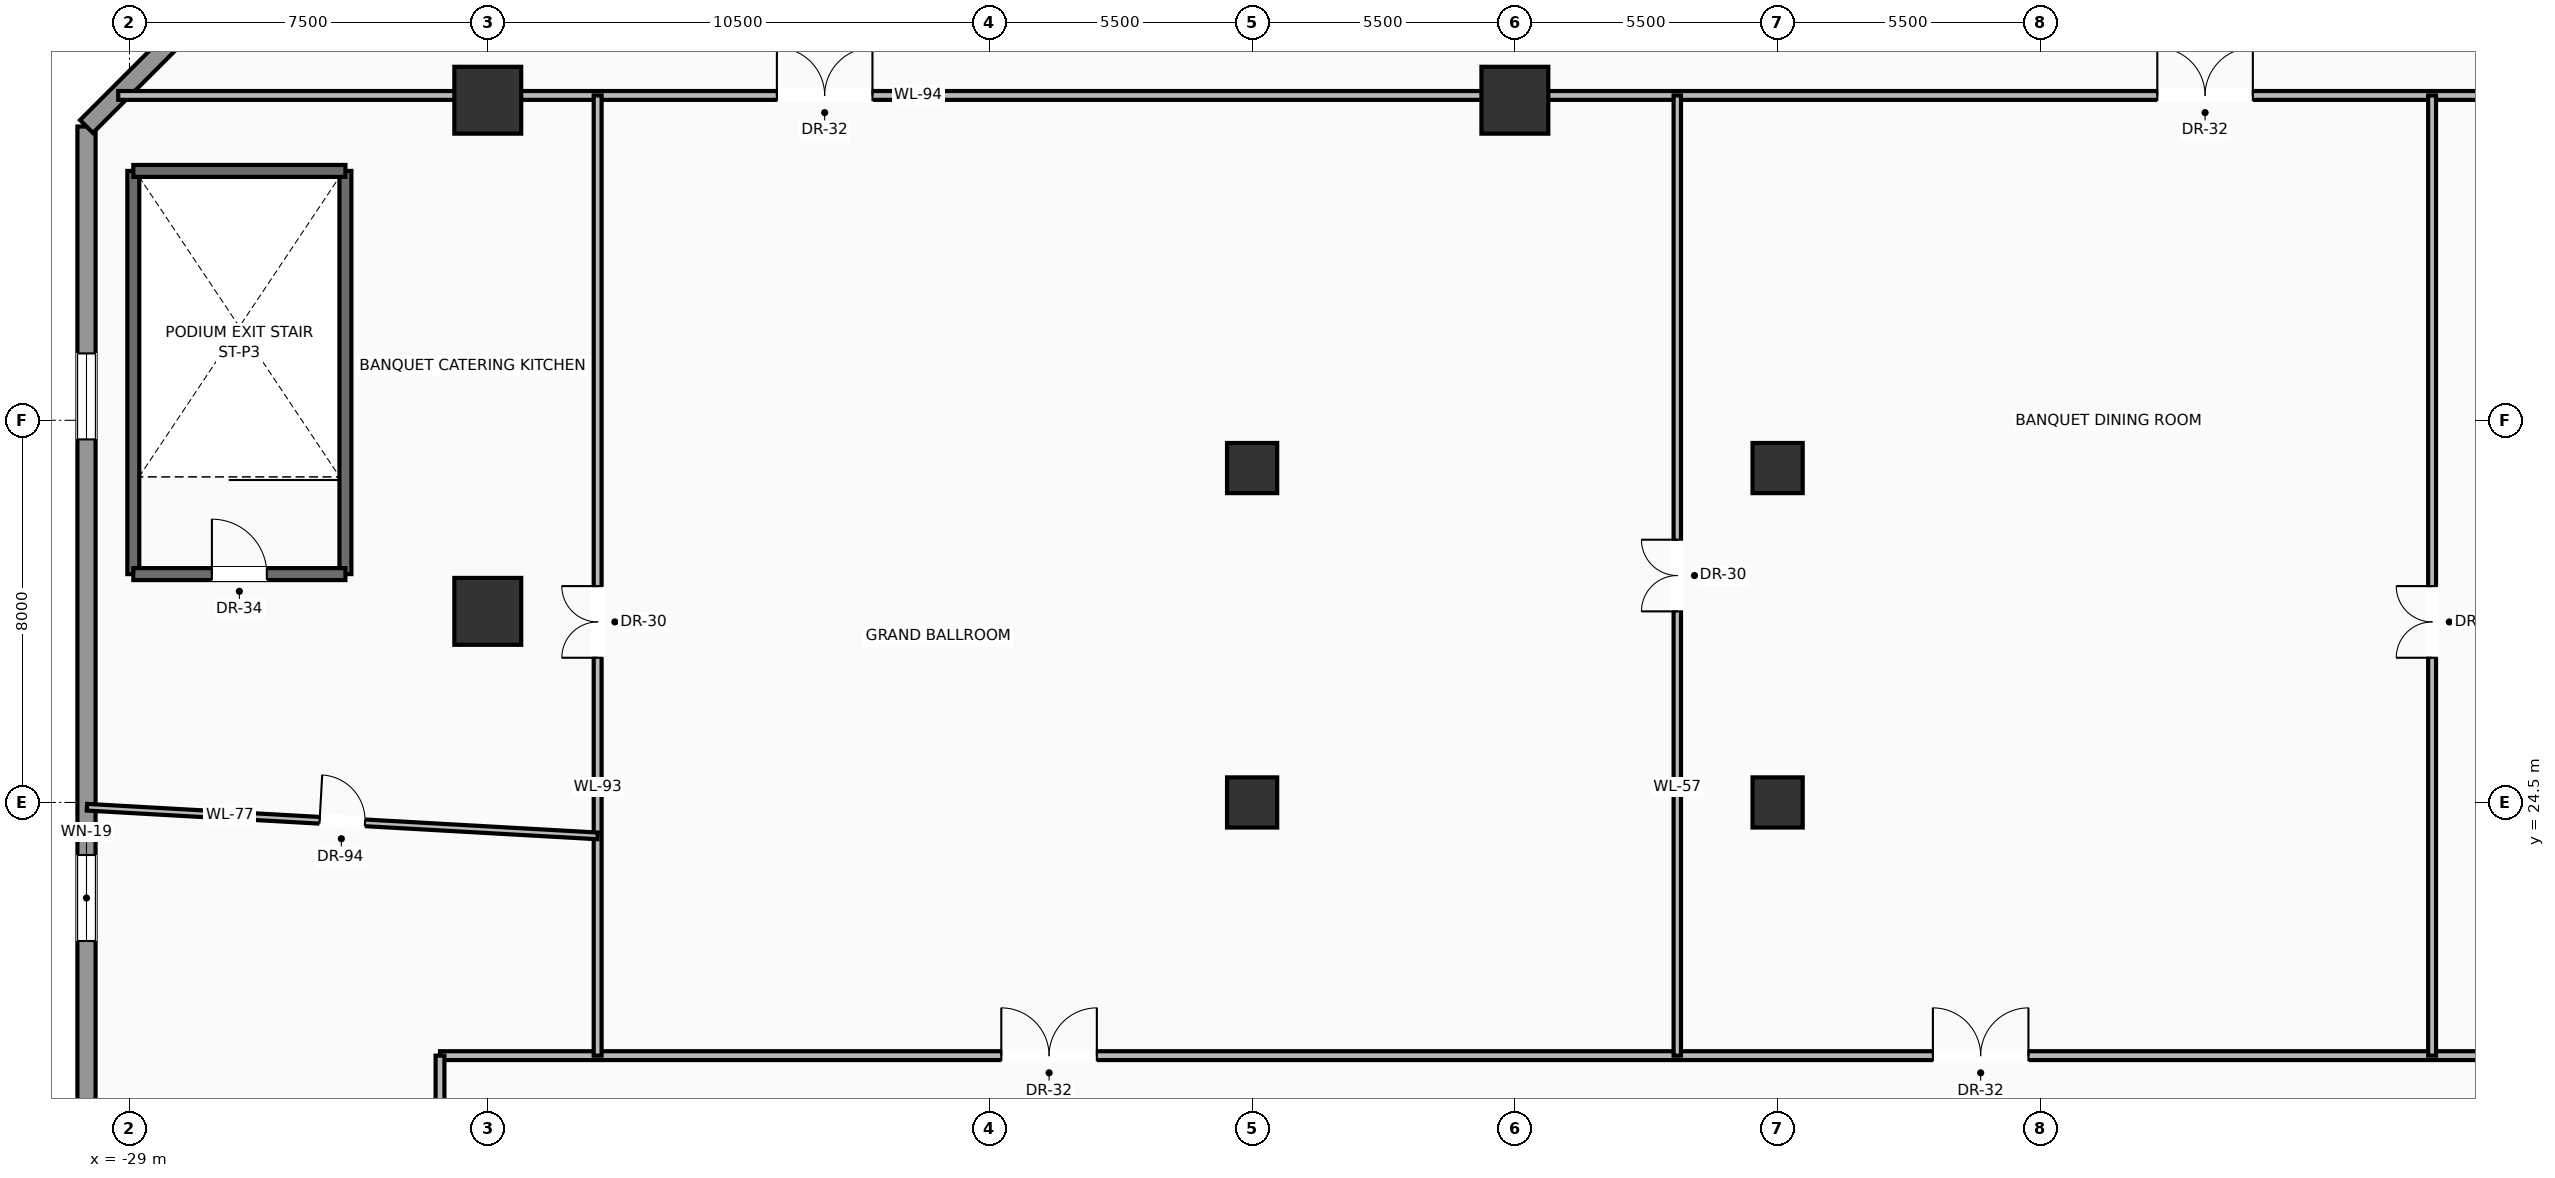
"""IFC4 building model, lengths in metres.
Left out: names, types, materials, properties, quantities, classifications, styles, units other than length and angle.
Written with IfcOpenShell. Run it as: python <this file> out.ifc"""

import sys

from ifc_helpers import new_model, si_unit, direction, frame, frame_2d, origin, origin_2d, place, context, subcontext, project, spatial, rectangle, hollow_rectangle, extrude, source, transform, mapped, element, fill, save


model = new_model("IFC4")
c1 = context("Model", 3, precision=1e-05, world=origin(), true_north=direction((0.0, 1.0)))
c2 = subcontext(c1, "Body", "Model", "MODEL_VIEW")
j1 = project(units=[si_unit("LENGTHUNIT", "METRE"), si_unit("PLANEANGLEUNIT", "RADIAN")], contexts=[c1])
p1 = place(None, origin())
s1 = spatial("IfcSite", under=j1, at=p1, CompositionType="ELEMENT")
p2 = place(p1, origin())
s2 = spatial("IfcBuilding", under=s1, at=p2, CompositionType="ELEMENT")
p3 = place(p2, frame((0.0, 0.0, 16.5)))
s3 = spatial("IfcBuildingStorey", under=s2, at=p3, CompositionType="ELEMENT", Elevation=16.5)
m1 = source(origin(), c2, "Body", "SweptSolid", [
    extrude(rectangle(XDim=1.05, YDim=1.05, at=origin_2d()), origin(), (0.0, 0.0, 1.0), 5.5),
])
for number, where, z_axis, x_axis in (
    (1, (-5.5, 24.5, 0.0), (0.0, 0.0, 1.0), (1.0, 0.0, 0.0)),
    (2, (5.5, 24.5, 0.0), (0.0, 0.0, 1.0), (1.0, 0.0, 0.0)),
    (3, (-5.5, 31.5, 0.0), (0.0, 0.0, 1.0), (1.0, 0.0, 0.0)),
    (4, (5.5, 31.5, 0.0), (0.0, 0.0, 1.0), (1.0, 0.0, 0.0)),
):
    element("IfcColumn", number, at=place(p3, frame(where, z_axis=z_axis, x_axis=x_axis)), inside=s3, PredefinedType="COLUMN", context=c2, shape_type="MappedRepresentation", body=[
        mapped(m1, transform((0.0, 0.0, 0.0), scale=1.0)),
    ])
m2 = source(origin(), c2, "Body", "SweptSolid", [
    extrude(hollow_rectangle(XDim=1.4, YDim=1.4, WallThickness=0.07, at=origin_2d()), origin(), (0.0, 0.0, 1.0), 5.5),
])
for number, where, z_axis, x_axis in (
    (5, (-21.5, 28.5, 0.0), (0.0, 0.0, 1.0), (1.0, 0.0, 0.0)),
    (6, (-21.5, 39.2, 0.0), (0.0, 0.0, 1.0), (1.0, 0.0, 0.0)),
    (7, (0.0, 39.2, 0.0), (0.0, 0.0, 1.0), (1.0, 0.0, 0.0)),
):
    element("IfcColumn", number, at=place(p3, frame(where, z_axis=z_axis, x_axis=x_axis)), inside=s3, PredefinedType="COLUMN", context=c2, shape_type="MappedRepresentation", body=[
        mapped(m2, transform((0.0, 0.0, 0.0), scale=1.0)),
    ])
p4 = place(p3, frame((-29.9, 5.05, 0.0), z_axis=(0.0, 0.0, 1.0), x_axis=(0.0, 1.0, 0.0)))
e8 = element("IfcWall", 8, at=p4, inside=s3, PredefinedType="SOLIDWALL", context=c2, shape_type="SweptSolid", body=[
    extrude(rectangle(XDim=33.6, YDim=0.38, at=frame_2d((16.8, 0.0))), origin(), (0.0, 0.0, 1.0), 3.99),
])
p5 = place(p4, frame((16.55, 0.0, 0.95)))
e9 = element("IfcOpeningElement", 9, at=p5, cuts=e8, PredefinedType="OPENING", context=c2, shape_type="SweptSolid", body=[
    extrude(rectangle(XDim=1.8, YDim=2.4, at=frame_2d((0.9, 1.2))), frame((0.0, 0.2, 0.0), z_axis=(0.0, -1.0, 0.0), x_axis=(1.0, 0.0, 0.0)), (0.0, 0.0, 1.0), 0.4),
])
p6 = place(p4, frame((27.05, 0.0, 0.95)))
e10 = element("IfcOpeningElement", 10, at=p6, cuts=e8, PredefinedType="OPENING", context=c2, shape_type="SweptSolid", body=[
    extrude(rectangle(XDim=1.8, YDim=2.4, at=frame_2d((0.9, 1.2))), frame((0.0, 0.2, 0.0), z_axis=(0.0, -1.0, 0.0), x_axis=(1.0, 0.0, 0.0)), (0.0, 0.0, 1.0), 0.4),
])
p7 = place(p3, frame((-29.9, 38.65, 0.0), z_axis=(0.0, 0.0, 1.0), x_axis=(0.707089688307, 0.707123873653, 0.0)))
e11 = element("IfcWall", 11, at=p7, inside=s3, PredefinedType="SOLIDWALL", context=c2, shape_type="SweptSolid", body=[
    extrude(rectangle(XDim=7.142, YDim=0.38, at=frame_2d((3.571, 0.0))), origin(), (0.0, 0.0, 1.0), 3.99),
])
for number, where, z_axis, x_axis in (
    (12, (-28.92, 29.28, 0.0), (0.0, 0.0, 1.0), (0.0, 1.0, 0.0)),
    (13, (-24.48, 29.28, 0.0), (0.0, 0.0, 1.0), (0.0, 1.0, 0.0)),
):
    element("IfcWall", number, at=place(p3, frame(where, z_axis=z_axis, x_axis=x_axis)), inside=s3, PredefinedType="SOLIDWALL", context=c2, shape_type="SweptSolid", body=[
        extrude(rectangle(XDim=8.44, YDim=0.25, at=frame_2d((4.22, 0.0))), origin(), (0.0, 0.0, 1.0), 5.05),
    ])
p8 = place(p3, frame((-28.92, 29.28, 0.0), z_axis=(0.0, 0.0, 1.0), x_axis=(1.0, 0.0, 0.0)))
e14 = element("IfcWall", 14, at=p8, inside=s3, PredefinedType="SOLIDWALL", context=c2, shape_type="SweptSolid", body=[
    extrude(rectangle(XDim=4.44, YDim=0.25, at=frame_2d((2.22, 0.0))), origin(), (0.0, 0.0, 1.0), 5.05),
])
p9 = place(p8, frame((1.645, 0.0, 0.0)))
e15 = element("IfcOpeningElement", 15, at=p9, cuts=e14, PredefinedType="OPENING", context=c2, shape_type="SweptSolid", body=[
    extrude(rectangle(XDim=1.15, YDim=2.2, at=frame_2d((0.575, 1.1))), frame((0.0, 0.135, 0.0), z_axis=(0.0, -1.0, 0.0), x_axis=(1.0, 0.0, 0.0)), (0.0, 0.0, 1.0), 0.27),
])
p10 = place(p3, frame((-24.48, 37.72, 0.0), z_axis=(0.0, 0.0, 1.0), x_axis=(-1.0, 0.0, 0.0)))
e16 = element("IfcWall", 16, at=p10, inside=s3, PredefinedType="SOLIDWALL", context=c2, shape_type="SweptSolid", body=[
    extrude(rectangle(XDim=4.44, YDim=0.25, at=frame_2d((2.22, 0.0))), origin(), (0.0, 0.0, 1.0), 5.05),
])
p11 = place(p3, frame((-29.236, 39.3, 0.0), z_axis=(0.0, 0.0, 1.0), x_axis=(1.0, 0.0, 0.0)))
e17 = element("IfcWall", 17, at=p11, inside=s3, PredefinedType="PARTITIONING", context=c2, shape_type="SweptSolid", body=[
    extrude(rectangle(XDim=58.472, YDim=0.185, at=frame_2d((29.236, 0.0))), origin(), (0.0, 0.0, 1.0), 4.002),
])
p12 = place(p11, frame((13.788, 0.0, 0.0)))
e18 = element("IfcOpeningElement", 18, at=p12, cuts=e17, PredefinedType="OPENING", context=c2, shape_type="SweptSolid", body=[
    extrude(rectangle(XDim=2.0, YDim=2.4, at=frame_2d((1.0, 1.2))), frame((0.0, 0.103, 0.0), z_axis=(0.0, -1.0, 0.0), x_axis=(1.0, 0.0, 0.0)), (0.0, 0.0, 1.0), 0.205),
])
p13 = place(p11, frame((42.684, 0.0, 0.0)))
e19 = element("IfcOpeningElement", 19, at=p13, cuts=e17, PredefinedType="OPENING", context=c2, shape_type="SweptSolid", body=[
    extrude(rectangle(XDim=2.0, YDim=2.4, at=frame_2d((1.0, 1.2))), frame((0.0, 0.103, 0.0), z_axis=(0.0, -1.0, 0.0), x_axis=(1.0, 0.0, 0.0)), (0.0, 0.0, 1.0), 0.205),
])
p14 = place(p3, frame((-22.5, 19.2, 0.0), z_axis=(0.0, 0.0, 1.0), x_axis=(1.0, 0.0, 0.0)))
e20 = element("IfcWall", 20, at=p14, inside=s3, PredefinedType="PARTITIONING", context=c2, shape_type="SweptSolid", body=[
    extrude(rectangle(XDim=45.0, YDim=0.185, at=frame_2d((22.5, 0.0))), origin(), (0.0, 0.0, 1.0), 4.002),
])
p15 = place(p14, frame((11.75, 0.0, 0.0)))
e21 = element("IfcOpeningElement", 21, at=p15, cuts=e20, PredefinedType="OPENING", context=c2, shape_type="SweptSolid", body=[
    extrude(rectangle(XDim=2.0, YDim=2.4, at=frame_2d((1.0, 1.2))), frame((0.0, 0.103, 0.0), z_axis=(0.0, -1.0, 0.0), x_axis=(1.0, 0.0, 0.0)), (0.0, 0.0, 1.0), 0.205),
])
p16 = place(p14, frame((31.25, 0.0, 0.0)))
e22 = element("IfcOpeningElement", 22, at=p16, cuts=e20, PredefinedType="OPENING", context=c2, shape_type="SweptSolid", body=[
    extrude(rectangle(XDim=2.0, YDim=2.4, at=frame_2d((1.0, 1.2))), frame((0.0, 0.103, 0.0), z_axis=(0.0, -1.0, 0.0), x_axis=(1.0, 0.0, 0.0)), (0.0, 0.0, 1.0), 0.205),
])
p17 = place(p3, frame((-22.5, 16.55, 0.0), z_axis=(0.0, 0.0, 1.0), x_axis=(0.0, 1.0, 0.0)))
e23 = element("IfcWall", 23, at=p17, inside=s3, PredefinedType="PARTITIONING", context=c2, shape_type="SweptSolid", body=[
    extrude(rectangle(XDim=2.65, YDim=0.185, at=frame_2d((1.325, 0.0))), origin(), (0.0, 0.0, 1.0), 5.042),
])
p18 = place(p3, frame((-19.2, 19.2, 0.0), z_axis=(0.0, 0.0, 1.0), x_axis=(0.0, 1.0, 0.0)))
e24 = element("IfcWall", 24, at=p18, inside=s3, PredefinedType="PARTITIONING", context=c2, shape_type="SweptSolid", body=[
    extrude(rectangle(XDim=20.1, YDim=0.165, at=frame_2d((10.05, 0.0))), origin(), (0.0, 0.0, 1.0), 4.002),
])
p19 = place(p18, frame((8.329, 0.0, 0.0)))
e25 = element("IfcOpeningElement", 25, at=p19, cuts=e24, PredefinedType="OPENING", context=c2, shape_type="SweptSolid", body=[
    extrude(rectangle(XDim=1.5, YDim=2.25, at=frame_2d((0.75, 1.125))), frame((0.0, 0.093, 0.0), z_axis=(0.0, -1.0, 0.0), x_axis=(1.0, 0.0, 0.0)), (0.0, 0.0, 1.0), 0.185),
])
p20 = place(p3, frame((19.2, 19.2, 0.0), z_axis=(0.0, 0.0, 1.0), x_axis=(0.0, 1.0, 0.0)))
e26 = element("IfcWall", 26, at=p20, inside=s3, PredefinedType="PARTITIONING", context=c2, shape_type="SweptSolid", body=[
    extrude(rectangle(XDim=20.1, YDim=0.165, at=frame_2d((10.05, 0.0))), origin(), (0.0, 0.0, 1.0), 4.002),
])
p21 = place(p20, frame((8.329, 0.0, 0.0)))
e27 = element("IfcOpeningElement", 27, at=p21, cuts=e26, PredefinedType="OPENING", context=c2, shape_type="SweptSolid", body=[
    extrude(rectangle(XDim=1.5, YDim=2.25, at=frame_2d((0.75, 1.125))), frame((0.0, 0.093, 0.0), z_axis=(0.0, -1.0, 0.0), x_axis=(1.0, 0.0, 0.0)), (0.0, 0.0, 1.0), 0.185),
])
p22 = place(p3, frame((3.4, 19.2, 0.0), z_axis=(0.0, 0.0, 1.0), x_axis=(0.0, 1.0, 0.0)))
e28 = element("IfcWall", 28, at=p22, inside=s3, PredefinedType="MOVABLE", context=c2, shape_type="SweptSolid", body=[
    extrude(rectangle(XDim=20.1, YDim=0.155, at=frame_2d((10.05, 0.0))), origin(), (0.0, 0.0, 1.0), 4.002),
])
p23 = place(p22, frame((9.3, 0.0, 0.0)))
e29 = element("IfcOpeningElement", 29, at=p23, cuts=e28, PredefinedType="OPENING", context=c2, shape_type="SweptSolid", body=[
    extrude(rectangle(XDim=1.5, YDim=2.25, at=frame_2d((0.75, 1.125))), frame((0.0, 0.087, 0.0), z_axis=(0.0, -1.0, 0.0), x_axis=(1.0, 0.0, 0.0)), (0.0, 0.0, 1.0), 0.175),
])
p24 = place(p3, frame((-29.89, 24.4, 0.0), z_axis=(0.0, 0.0, 1.0), x_axis=(0.99842932753, -0.056025689895, 0.0)))
e30 = element("IfcWall", 30, at=p24, inside=s3, PredefinedType="PARTITIONING", context=c2, shape_type="SweptSolid", body=[
    extrude(rectangle(XDim=10.707, YDim=0.14, at=frame_2d((5.354, 0.0))), origin(), (0.0, 0.0, 1.0), 4.115),
])
p25 = place(p24, frame((4.878, 0.0, 0.0)))
e31 = element("IfcOpeningElement", 31, at=p25, cuts=e30, PredefinedType="OPENING", context=c2, shape_type="SweptSolid", body=[
    extrude(rectangle(XDim=0.95, YDim=2.2, at=frame_2d((0.475, 1.1))), frame((0.0, 0.08, 0.0), z_axis=(0.0, -1.0, 0.0), x_axis=(1.0, 0.0, 0.0)), (0.0, 0.0, 1.0), 0.16),
])
m3 = source(origin(), c2, "Body", "SweptSolid", [
    extrude(rectangle(XDim=1.8, YDim=2.4, at=frame_2d((0.9, 1.2))), frame((0.0, 0.03, 0.0), z_axis=(0.0, -1.0, 0.0), x_axis=(1.0, 0.0, 0.0)), (0.0, 0.0, 1.0), 0.06),
])
p26 = place(p5, origin())
e32 = element("IfcWindow", 32, at=p26, inside=s3, PartitioningType="SINGLE_PANEL", PredefinedType="WINDOW", context=c2, shape_type="MappedRepresentation", body=[
    mapped(m3, transform((0.0, 0.0, 0.0), scale=1.0)),
])
fill(e9, e32)
p27 = place(p6, origin())
e33 = element("IfcWindow", 33, at=p27, inside=s3, PartitioningType="SINGLE_PANEL", PredefinedType="WINDOW", context=c2, shape_type="MappedRepresentation", body=[
    mapped(m3, transform((0.0, 0.0, 0.0), scale=1.0)),
])
fill(e10, e33)
m4 = source(origin(), c2, "Body", "SweptSolid", [
    extrude(rectangle(XDim=1.15, YDim=2.2, at=frame_2d((0.575, 1.1))), frame((0.0, 0.025, 0.0), z_axis=(0.0, -1.0, 0.0), x_axis=(1.0, 0.0, 0.0)), (0.0, 0.0, 1.0), 0.05),
])
p28 = place(p9, origin())
e34 = element("IfcDoor", 34, at=p28, inside=s3, OperationType="SINGLE_SWING_LEFT", PredefinedType="DOOR", context=c2, shape_type="MappedRepresentation", body=[
    mapped(m4, transform((0.0, 0.0, 0.0), scale=1.0)),
])
fill(e15, e34)
m5 = source(origin(), c2, "Body", "SweptSolid", [
    extrude(rectangle(XDim=2.0, YDim=2.4, at=frame_2d((1.0, 1.2))), frame((0.0, 0.025, 0.0), z_axis=(0.0, -1.0, 0.0), x_axis=(1.0, 0.0, 0.0)), (0.0, 0.0, 1.0), 0.05),
])
p29 = place(p12, origin())
e35 = element("IfcDoor", 35, at=p29, inside=s3, OperationType="DOUBLE_DOOR_SINGLE_SWING", PredefinedType="DOOR", context=c2, shape_type="MappedRepresentation", body=[
    mapped(m5, transform((0.0, 0.0, 0.0), scale=1.0)),
])
fill(e18, e35)
p30 = place(p13, origin())
e36 = element("IfcDoor", 36, at=p30, inside=s3, OperationType="DOUBLE_DOOR_SINGLE_SWING", PredefinedType="DOOR", context=c2, shape_type="MappedRepresentation", body=[
    mapped(m5, transform((0.0, 0.0, 0.0), scale=1.0)),
])
fill(e19, e36)
p31 = place(p15, origin())
e37 = element("IfcDoor", 37, at=p31, inside=s3, OperationType="DOUBLE_DOOR_SINGLE_SWING", PredefinedType="DOOR", context=c2, shape_type="MappedRepresentation", body=[
    mapped(m5, transform((0.0, 0.0, 0.0), scale=1.0)),
])
fill(e21, e37)
p32 = place(p16, origin())
e38 = element("IfcDoor", 38, at=p32, inside=s3, OperationType="DOUBLE_DOOR_SINGLE_SWING", PredefinedType="DOOR", context=c2, shape_type="MappedRepresentation", body=[
    mapped(m5, transform((0.0, 0.0, 0.0), scale=1.0)),
])
fill(e22, e38)
m6 = source(origin(), c2, "Body", "SweptSolid", [
    extrude(rectangle(XDim=1.5, YDim=2.25, at=frame_2d((0.75, 1.125))), frame((0.0, 0.025, 0.0), z_axis=(0.0, -1.0, 0.0), x_axis=(1.0, 0.0, 0.0)), (0.0, 0.0, 1.0), 0.05),
])
p33 = place(p19, origin())
e39 = element("IfcDoor", 39, at=p33, inside=s3, OperationType="DOUBLE_DOOR_SINGLE_SWING", PredefinedType="DOOR", context=c2, shape_type="MappedRepresentation", body=[
    mapped(m6, transform((0.0, 0.0, 0.0), scale=1.0)),
])
fill(e25, e39)
p34 = place(p21, origin())
e40 = element("IfcDoor", 40, at=p34, inside=s3, OperationType="DOUBLE_DOOR_SINGLE_SWING", PredefinedType="DOOR", context=c2, shape_type="MappedRepresentation", body=[
    mapped(m6, transform((0.0, 0.0, 0.0), scale=1.0)),
])
fill(e27, e40)
p35 = place(p23, origin())
e41 = element("IfcDoor", 41, at=p35, inside=s3, OperationType="DOUBLE_DOOR_SINGLE_SWING", PredefinedType="DOOR", context=c2, shape_type="MappedRepresentation", body=[
    mapped(m6, transform((0.0, 0.0, 0.0), scale=1.0)),
])
fill(e29, e41)
m7 = source(origin(), c2, "Body", "SweptSolid", [
    extrude(rectangle(XDim=0.95, YDim=2.2, at=frame_2d((0.475, 1.1))), frame((0.0, 0.025, 0.0), z_axis=(0.0, -1.0, 0.0), x_axis=(1.0, 0.0, 0.0)), (0.0, 0.0, 1.0), 0.05),
])
p36 = place(p25, origin())
e42 = element("IfcDoor", 42, at=p36, inside=s3, OperationType="SINGLE_SWING_LEFT", PredefinedType="DOOR", context=c2, shape_type="MappedRepresentation", body=[
    mapped(m7, transform((0.0, 0.0, 0.0), scale=1.0)),
])
fill(e31, e42)
save(model, sys.argv[1])
